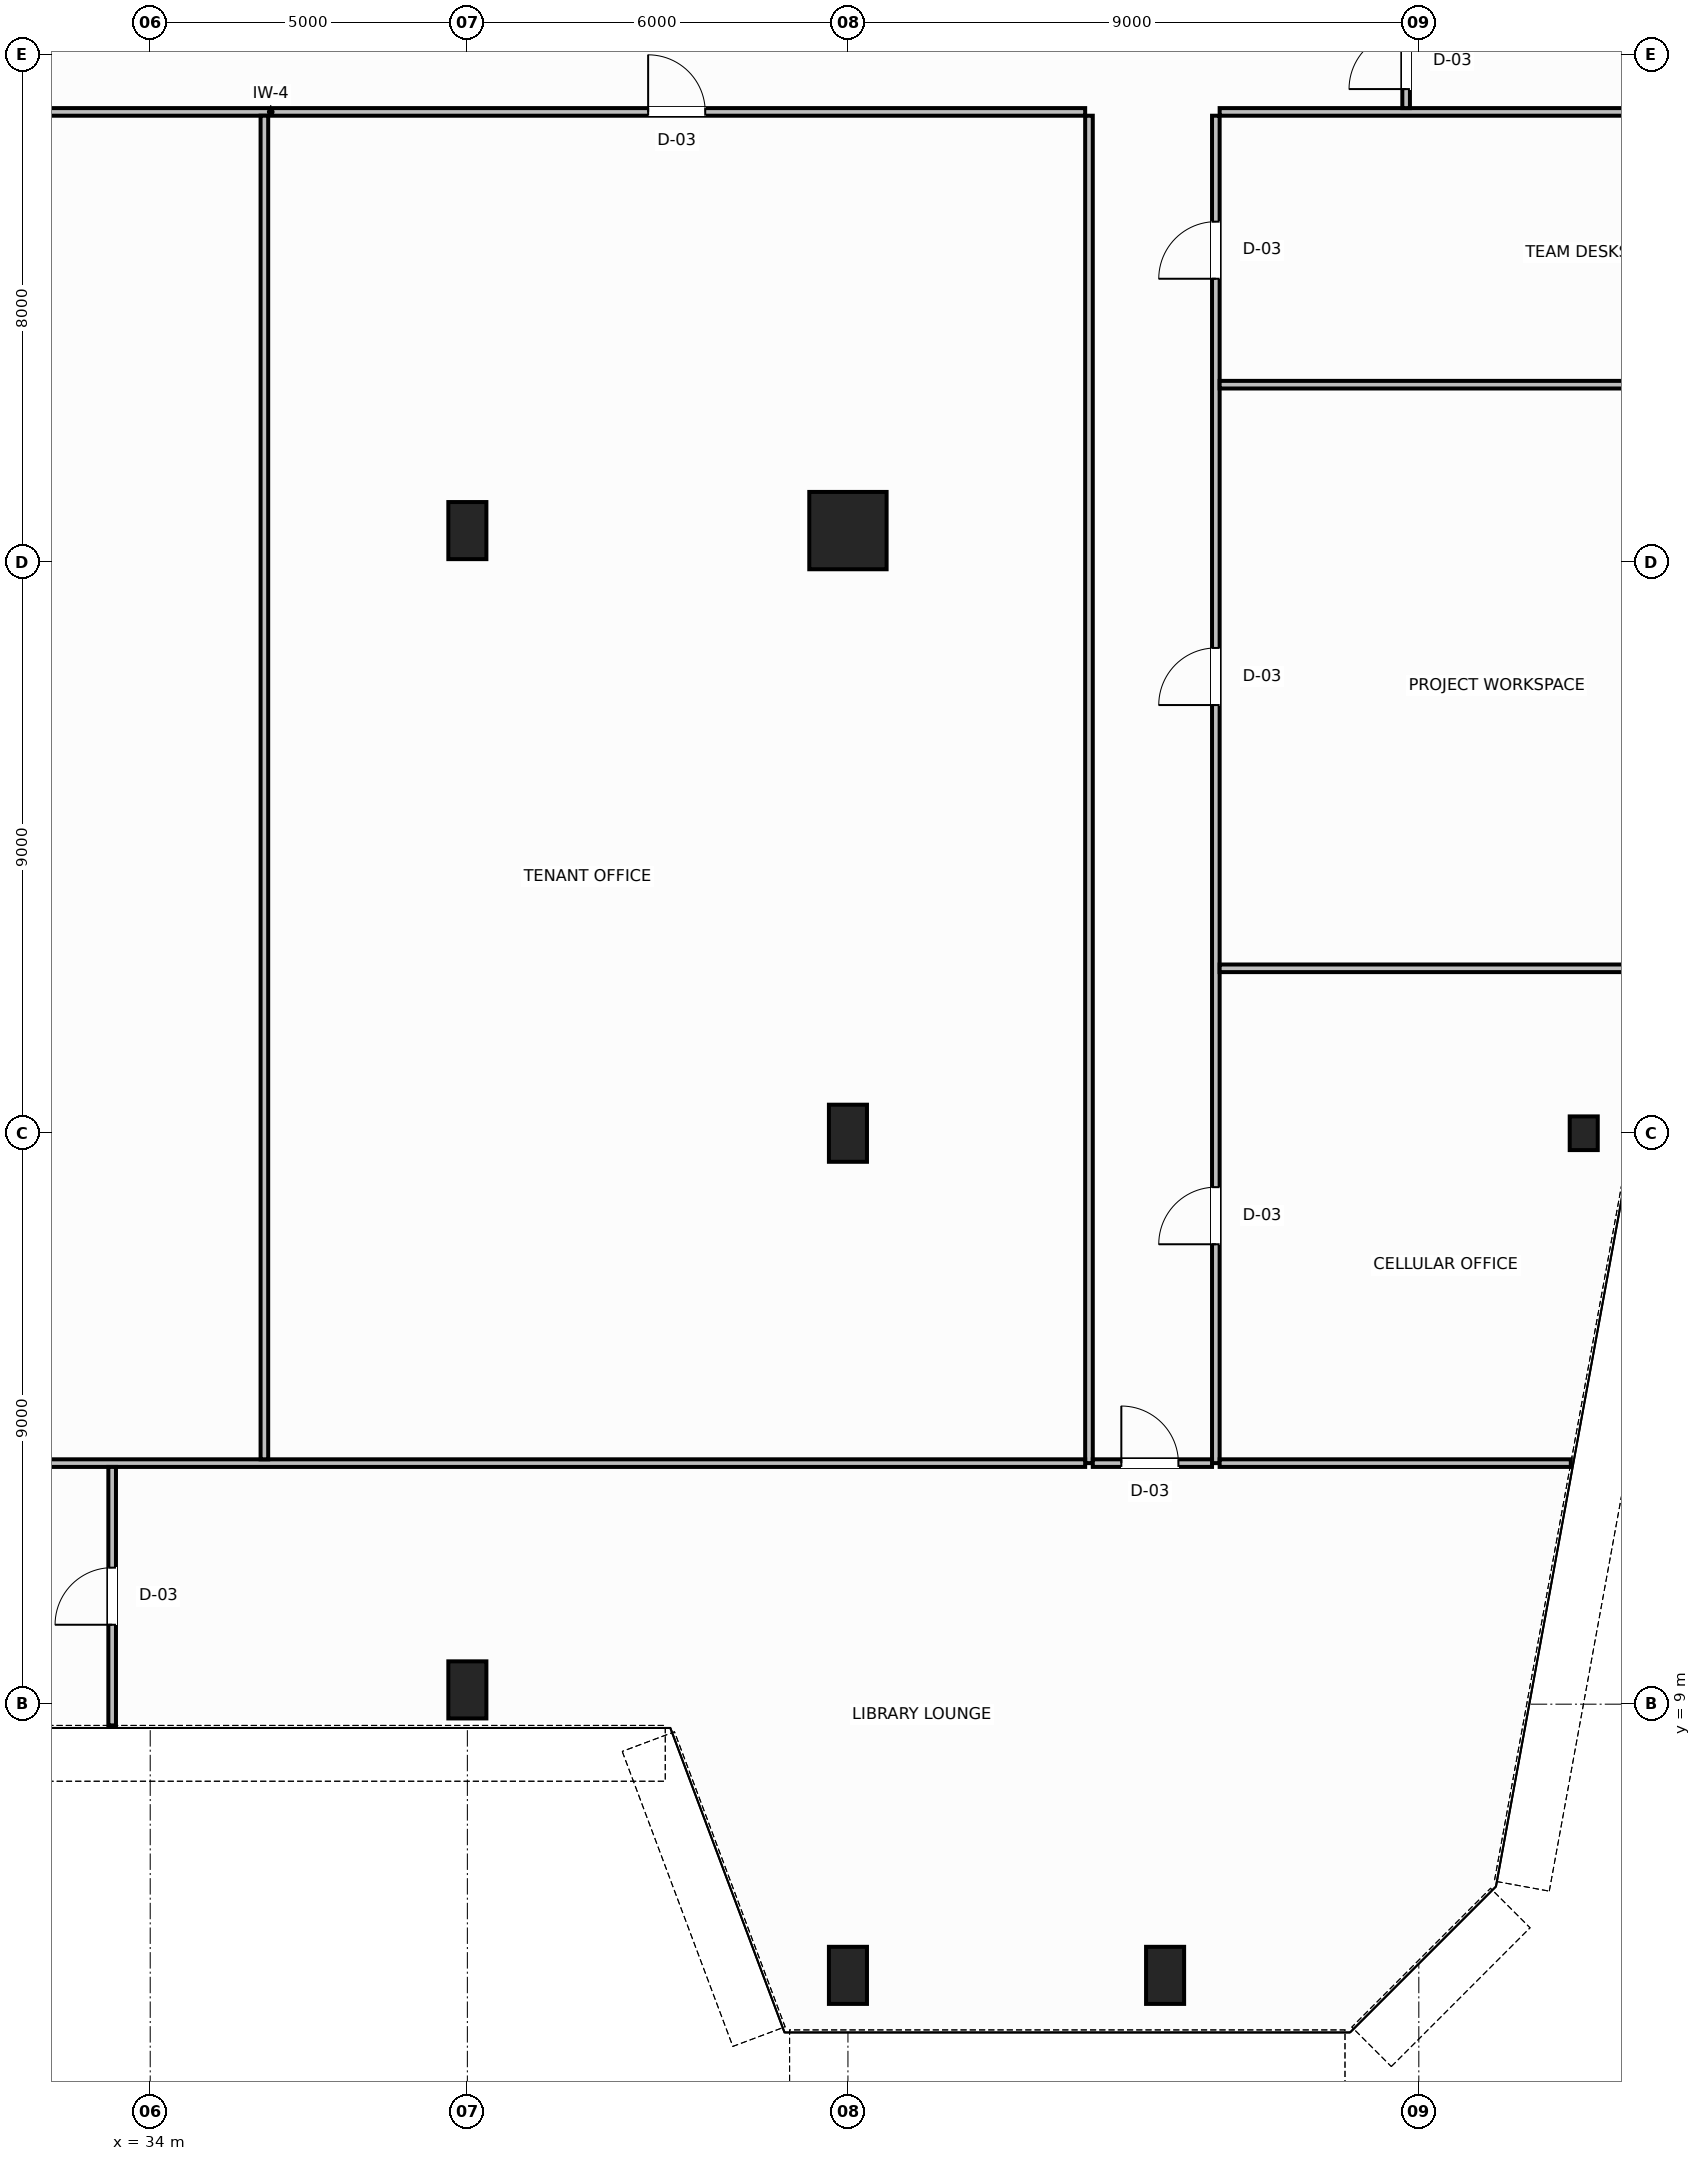
"""IFC4 building model, lengths in metres.
Left out: names, types, materials, properties, quantities, classifications, styles, units other than length and angle.
Written with IfcOpenShell. Run it as: python <this file> out.ifc"""

import sys

from ifc_helpers import new_model, si_unit, direction, frame, frame_2d, origin, origin_2d, place, context, subcontext, project, spatial, rectangle, hollow_rectangle, hollow_circle, i_section, extrude, source, transform, mapped, element, fill, save


model = new_model("IFC4")
c1 = context("Model", 3, precision=1e-05, world=origin(), true_north=direction((0.0, 1.0)))
c2 = subcontext(c1, "Body", "Model", "MODEL_VIEW")
j1 = project(units=[si_unit("LENGTHUNIT", "METRE"), si_unit("PLANEANGLEUNIT", "RADIAN")], contexts=[c1])
p1 = place(None, origin())
s1 = spatial("IfcSite", under=j1, at=p1, CompositionType="ELEMENT")
p2 = place(p1, origin())
s2 = spatial("IfcBuilding", under=s1, at=p2, CompositionType="ELEMENT")
p3 = place(p2, frame((0.0, 0.0, 79.6)))
s3 = spatial("IfcBuildingStorey", under=s2, at=p3, CompositionType="ELEMENT", Elevation=79.6)
m1 = source(origin(), c2, "Body", "SweptSolid", [
    extrude(i_section(OverallWidth=0.442, OverallDepth=0.531, WebThickness=0.065, FlangeThickness=0.076, FilletRadius=0.015, at=origin_2d()), origin(), (0.0, 0.0, 1.0), 3.8),
])
p4 = place(p3, frame((56.6, 18.0, 0.0), z_axis=(0.0, 0.0, 1.0), x_axis=(1.0, 0.0, 0.0)))
e1 = element("IfcColumn", 1, at=p4, inside=s3, PredefinedType="COLUMN", context=c2, shape_type="MappedRepresentation", body=[
    mapped(m1, transform((0.0, 0.0, 0.0), scale=1.0)),
])
m2 = source(origin(), c2, "Body", "SweptSolid", [
    extrude(hollow_rectangle(XDim=0.6, YDim=0.9, WallThickness=0.04, InnerFilletRadius=0.04, OuterFilletRadius=0.08, at=origin_2d()), origin(), (0.0, 0.0, 1.0), 3.8),
])
p5 = place(p3, frame((39.0, 27.5, 0.0), z_axis=(0.0, 0.0, 1.0), x_axis=(1.0, 0.0, 0.0)))
e2 = element("IfcColumn", 2, at=p5, inside=s3, PredefinedType="COLUMN", context=c2, shape_type="MappedRepresentation", body=[
    mapped(m2, transform((0.0, 0.0, 0.0), scale=1.0)),
])
m3 = source(origin(), c2, "Body", "SweptSolid", [
    extrude(hollow_circle(Radius=0.61, WallThickness=0.05, at=origin_2d()), origin(), (0.0, 0.0, 1.0), 3.8),
])
p6 = place(p3, frame((45.0, 27.5, 0.0), z_axis=(0.0, 0.0, 1.0), x_axis=(1.0, 0.0, 0.0)))
e3 = element("IfcColumn", 3, at=p6, inside=s3, PredefinedType="COLUMN", context=c2, shape_type="MappedRepresentation", body=[
    mapped(m3, transform((0.0, 0.0, 0.0), scale=1.0)),
])
for number, where, z_axis, x_axis in (
    (4, (45.0, 18.0, 0.0), (0.0, 0.0, 1.0), (1.0, 0.0, 0.0)),
    (5, (39.0, 9.225, 0.0), (0.0, 0.0, 1.0), (1.0, 0.0, 0.0)),
    (6, (45.0, 4.725, 0.0), (0.0, 0.0, 1.0), (1.0, 0.0, 0.0)),
    (7, (50.0, 4.725, 0.0), (0.0, 0.0, 1.0), (1.0, 0.0, 0.0)),
):
    element("IfcColumn", number, at=place(p3, frame(where, z_axis=z_axis, x_axis=x_axis)), inside=s3, PredefinedType="COLUMN", context=c2, shape_type="MappedRepresentation", body=[
        mapped(m2, transform((0.0, 0.0, 0.0), scale=1.0)),
    ])
p7 = place(p3, frame((19.26, 34.1, 0.0), z_axis=(0.0, 0.0, 1.0), x_axis=(1.0, 0.0, 0.0)))
e8 = element("IfcWall", 8, at=p7, inside=s3, PredefinedType="PARTITIONING", context=c2, shape_type="SweptSolid", body=[
    extrude(rectangle(XDim=29.48, YDim=0.12, at=frame_2d((14.74, 0.0))), origin(), (0.0, 0.0, 1.0), 3.54),
])
p8 = place(p7, frame((1.49, 0.0, 0.0)))
e9 = element("IfcOpeningElement", 9, at=p8, cuts=e8, PredefinedType="OPENING", context=c2, shape_type="SweptSolid", body=[
    extrude(rectangle(XDim=0.9, YDim=2.15, at=frame_2d((0.45, 1.075))), frame((0.0, 0.07, 0.0), z_axis=(0.0, -1.0, 0.0), x_axis=(1.0, 0.0, 0.0)), (0.0, 0.0, 1.0), 0.14),
])
p9 = place(p7, frame((9.79, 0.0, 0.0)))
e10 = element("IfcOpeningElement", 10, at=p9, cuts=e8, PredefinedType="OPENING", context=c2, shape_type="SweptSolid", body=[
    extrude(rectangle(XDim=0.9, YDim=2.15, at=frame_2d((0.45, 1.075))), frame((0.0, 0.07, 0.0), z_axis=(0.0, -1.0, 0.0), x_axis=(1.0, 0.0, 0.0)), (0.0, 0.0, 1.0), 0.14),
])
p10 = place(p7, frame((22.59, 0.0, 0.0)))
e11 = element("IfcOpeningElement", 11, at=p10, cuts=e8, PredefinedType="OPENING", context=c2, shape_type="SweptSolid", body=[
    extrude(rectangle(XDim=0.9, YDim=2.15, at=frame_2d((0.45, 1.075))), frame((0.0, 0.07, 0.0), z_axis=(0.0, -1.0, 0.0), x_axis=(1.0, 0.0, 0.0)), (0.0, 0.0, 1.0), 0.14),
])
p11 = place(p3, frame((50.86, 34.1, 0.0), z_axis=(0.0, 0.0, 1.0), x_axis=(1.0, 0.0, 0.0)))
e12 = element("IfcWall", 12, at=p11, inside=s3, PredefinedType="PARTITIONING", context=c2, shape_type="SweptSolid", body=[
    extrude(rectangle(XDim=9.431, YDim=0.12, at=frame_2d((4.715, 0.0))), origin(), (0.0, 0.0, 1.0), 3.54),
])
p12 = place(p3, frame((53.8, 34.16, 0.0), z_axis=(0.0, 0.0, 1.0), x_axis=(0.0, 1.0, 0.0)))
e13 = element("IfcWall", 13, at=p12, inside=s3, PredefinedType="PARTITIONING", context=c2, shape_type="SweptSolid", body=[
    extrude(rectangle(XDim=2.28, YDim=0.12, at=frame_2d((1.14, 0.0))), origin(), (0.0, 0.0, 1.0), 3.54),
])
p13 = place(p12, frame((0.3, 0.0, 0.0)))
e14 = element("IfcOpeningElement", 14, at=p13, cuts=e13, PredefinedType="OPENING", context=c2, shape_type="SweptSolid", body=[
    extrude(rectangle(XDim=0.9, YDim=2.15, at=frame_2d((0.45, 1.075))), frame((0.0, 0.07, 0.0), z_axis=(0.0, -1.0, 0.0), x_axis=(1.0, 0.0, 0.0)), (0.0, 0.0, 1.0), 0.14),
])
p14 = place(p3, frame((48.8, 12.8, 0.0), z_axis=(0.0, 0.0, 1.0), x_axis=(0.0, 1.0, 0.0)))
e15 = element("IfcWall", 15, at=p14, inside=s3, PredefinedType="PARTITIONING", context=c2, shape_type="SweptSolid", body=[
    extrude(rectangle(XDim=21.24, YDim=0.12, at=frame_2d((10.62, 0.0))), origin(), (0.0, 0.0, 1.0), 3.54),
])
p15 = place(p3, frame((50.8, 12.8, 0.0), z_axis=(0.0, 0.0, 1.0), x_axis=(0.0, 1.0, 0.0)))
e16 = element("IfcWall", 16, at=p15, inside=s3, PredefinedType="PARTITIONING", context=c2, shape_type="SweptSolid", body=[
    extrude(rectangle(XDim=21.24, YDim=0.12, at=frame_2d((10.62, 0.0))), origin(), (0.0, 0.0, 1.0), 3.54),
])
p16 = place(p15, frame((3.45, 0.0, 0.0)))
e17 = element("IfcOpeningElement", 17, at=p16, cuts=e16, PredefinedType="OPENING", context=c2, shape_type="SweptSolid", body=[
    extrude(rectangle(XDim=0.9, YDim=2.15, at=frame_2d((0.45, 1.075))), frame((0.0, 0.07, 0.0), z_axis=(0.0, -1.0, 0.0), x_axis=(1.0, 0.0, 0.0)), (0.0, 0.0, 1.0), 0.14),
])
p17 = place(p15, frame((11.95, 0.0, 0.0)))
e18 = element("IfcOpeningElement", 18, at=p17, cuts=e16, PredefinedType="OPENING", context=c2, shape_type="SweptSolid", body=[
    extrude(rectangle(XDim=0.9, YDim=2.15, at=frame_2d((0.45, 1.075))), frame((0.0, 0.07, 0.0), z_axis=(0.0, -1.0, 0.0), x_axis=(1.0, 0.0, 0.0)), (0.0, 0.0, 1.0), 0.14),
])
p18 = place(p15, frame((18.67, 0.0, 0.0)))
e19 = element("IfcOpeningElement", 19, at=p18, cuts=e16, PredefinedType="OPENING", context=c2, shape_type="SweptSolid", body=[
    extrude(rectangle(XDim=0.9, YDim=2.15, at=frame_2d((0.45, 1.075))), frame((0.0, 0.07, 0.0), z_axis=(0.0, -1.0, 0.0), x_axis=(1.0, 0.0, 0.0)), (0.0, 0.0, 1.0), 0.14),
])
p19 = place(p3, frame((48.86, 12.8, 0.0), z_axis=(0.0, 0.0, 1.0), x_axis=(1.0, 0.0, 0.0)))
e20 = element("IfcWall", 20, at=p19, inside=s3, PredefinedType="PARTITIONING", context=c2, shape_type="SweptSolid", body=[
    extrude(rectangle(XDim=1.88, YDim=0.12, at=frame_2d((0.94, 0.0))), origin(), (0.0, 0.0, 1.0), 3.54),
])
p20 = place(p19, frame((0.45, 0.0, 0.0)))
e21 = element("IfcOpeningElement", 21, at=p20, cuts=e20, PredefinedType="OPENING", context=c2, shape_type="SweptSolid", body=[
    extrude(rectangle(XDim=0.9, YDim=2.15, at=frame_2d((0.45, 1.075))), frame((0.0, 0.07, 0.0), z_axis=(0.0, -1.0, 0.0), x_axis=(1.0, 0.0, 0.0)), (0.0, 0.0, 1.0), 0.14),
])
p21 = place(p3, frame((50.86, 12.8, 0.0), z_axis=(0.0, 0.0, 1.0), x_axis=(1.0, 0.0, 0.0)))
e22 = element("IfcWall", 22, at=p21, inside=s3, PredefinedType="PARTITIONING", context=c2, shape_type="SweptSolid", body=[
    extrude(rectangle(XDim=5.536, YDim=0.12, at=frame_2d((2.768, 0.0))), origin(), (0.0, 0.0, 1.0), 3.54),
])
p22 = place(p3, frame((50.86, 20.6, 0.0), z_axis=(0.0, 0.0, 1.0), x_axis=(1.0, 0.0, 0.0)))
e23 = element("IfcWall", 23, at=p22, inside=s3, PredefinedType="PARTITIONING", context=c2, shape_type="SweptSolid", body=[
    extrude(rectangle(XDim=6.962, YDim=0.12, at=frame_2d((3.481, 0.0))), origin(), (0.0, 0.0, 1.0), 3.54),
])
p23 = place(p3, frame((50.86, 29.8, 0.0), z_axis=(0.0, 0.0, 1.0), x_axis=(1.0, 0.0, 0.0)))
e24 = element("IfcWall", 24, at=p23, inside=s3, PredefinedType="PARTITIONING", context=c2, shape_type="SweptSolid", body=[
    extrude(rectangle(XDim=8.645, YDim=0.12, at=frame_2d((4.322, 0.0))), origin(), (0.0, 0.0, 1.0), 3.54),
])
p24 = place(p3, frame((19.26, 12.8, 0.0), z_axis=(0.0, 0.0, 1.0), x_axis=(1.0, 0.0, 0.0)))
e25 = element("IfcWall", 25, at=p24, inside=s3, PredefinedType="PARTITIONING", context=c2, shape_type="SweptSolid", body=[
    extrude(rectangle(XDim=29.48, YDim=0.12, at=frame_2d((14.74, 0.0))), origin(), (0.0, 0.0, 1.0), 3.54),
])
p25 = place(p3, frame((35.8, 12.86, 0.0), z_axis=(0.0, 0.0, 1.0), x_axis=(0.0, 1.0, 0.0)))
e26 = element("IfcWall", 26, at=p25, inside=s3, PredefinedType="PARTITIONING", context=c2, shape_type="SweptSolid", body=[
    extrude(rectangle(XDim=21.18, YDim=0.12, at=frame_2d((10.59, 0.0))), origin(), (0.0, 0.0, 1.0), 3.54),
])
p26 = place(p3, frame((33.4, 8.665, 0.0), z_axis=(0.0, 0.0, 1.0), x_axis=(0.0, 1.0, 0.0)))
e27 = element("IfcWall", 27, at=p26, inside=s3, PredefinedType="PARTITIONING", context=c2, shape_type="SweptSolid", body=[
    extrude(rectangle(XDim=4.075, YDim=0.12, at=frame_2d((2.037, 0.0))), origin(), (0.0, 0.0, 1.0), 3.54),
])
p27 = place(p26, frame((1.587, 0.0, 0.0)))
e28 = element("IfcOpeningElement", 28, at=p27, cuts=e27, PredefinedType="OPENING", context=c2, shape_type="SweptSolid", body=[
    extrude(rectangle(XDim=0.9, YDim=2.15, at=frame_2d((0.45, 1.075))), frame((0.0, 0.07, 0.0), z_axis=(0.0, -1.0, 0.0), x_axis=(1.0, 0.0, 0.0)), (0.0, 0.0, 1.0), 0.14),
])
m4 = source(origin(), c2, "Body", "SweptSolid", [
    extrude(rectangle(XDim=0.9, YDim=2.15, at=frame_2d((0.45, 1.075))), frame((0.0, 0.025, 0.0), z_axis=(0.0, -1.0, 0.0), x_axis=(1.0, 0.0, 0.0)), (0.0, 0.0, 1.0), 0.05),
])
p28 = place(p13, origin())
e29 = element("IfcDoor", 29, at=p28, inside=s3, OperationType="SINGLE_SWING_RIGHT", PredefinedType="DOOR", context=c2, shape_type="MappedRepresentation", body=[
    mapped(m4, transform((0.0, 0.0, 0.0), scale=1.0)),
])
fill(e14, e29)
p29 = place(p16, origin())
e30 = element("IfcDoor", 30, at=p29, inside=s3, OperationType="SINGLE_SWING_RIGHT", PredefinedType="DOOR", context=c2, shape_type="MappedRepresentation", body=[
    mapped(m4, transform((0.0, 0.0, 0.0), scale=1.0)),
])
fill(e17, e30)
p30 = place(p17, origin())
e31 = element("IfcDoor", 31, at=p30, inside=s3, OperationType="SINGLE_SWING_LEFT", PredefinedType="DOOR", context=c2, shape_type="MappedRepresentation", body=[
    mapped(m4, transform((0.0, 0.0, 0.0), scale=1.0)),
])
fill(e18, e31)
p31 = place(p18, origin())
e32 = element("IfcDoor", 32, at=p31, inside=s3, OperationType="SINGLE_SWING_RIGHT", PredefinedType="DOOR", context=c2, shape_type="MappedRepresentation", body=[
    mapped(m4, transform((0.0, 0.0, 0.0), scale=1.0)),
])
fill(e19, e32)
p32 = place(p10, origin())
e33 = element("IfcDoor", 33, at=p32, inside=s3, OperationType="SINGLE_SWING_LEFT", PredefinedType="DOOR", context=c2, shape_type="MappedRepresentation", body=[
    mapped(m4, transform((0.0, 0.0, 0.0), scale=1.0)),
])
fill(e11, e33)
p33 = place(p27, origin())
e34 = element("IfcDoor", 34, at=p33, inside=s3, OperationType="SINGLE_SWING_RIGHT", PredefinedType="DOOR", context=c2, shape_type="MappedRepresentation", body=[
    mapped(m4, transform((0.0, 0.0, 0.0), scale=1.0)),
])
fill(e28, e34)
p34 = place(p20, origin())
e35 = element("IfcDoor", 35, at=p34, inside=s3, OperationType="SINGLE_SWING_RIGHT", PredefinedType="DOOR", context=c2, shape_type="MappedRepresentation", body=[
    mapped(m4, transform((0.0, 0.0, 0.0), scale=1.0)),
])
fill(e21, e35)
save(model, sys.argv[1])
